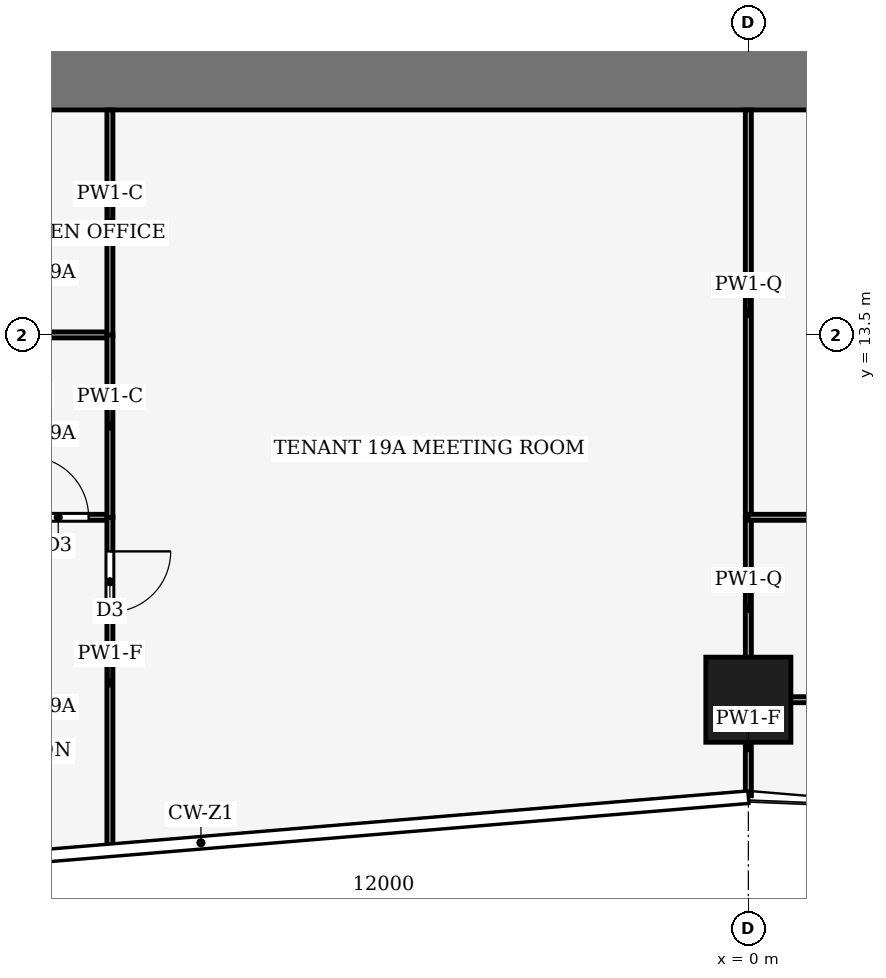
"""IFC4 building model, lengths in metres.
Left out: names, types, materials, properties, quantities, classifications, styles, units other than length and angle.
Written with IfcOpenShell. Run it as: python <this file> out.ifc"""

import sys

from ifc_helpers import new_model, si_unit, direction, frame, frame_2d, origin, origin_2d, place, context, subcontext, project, spatial, rectangle, hollow_rectangle, extrude, element, fill, save


model = new_model("IFC4")
c1 = context("Model", 3, precision=1e-05, world=origin(), true_north=direction((0.0, 1.0)))
c2 = subcontext(c1, "Body", "Model", "MODEL_VIEW")
j1 = project(units=[si_unit("LENGTHUNIT", "METRE"), si_unit("PLANEANGLEUNIT", "RADIAN")], contexts=[c1])
p1 = place(None, origin())
s1 = spatial("IfcSite", under=j1, at=p1, CompositionType="ELEMENT")
p2 = place(p1, origin())
s2 = spatial("IfcBuilding", under=s1, at=p2, CompositionType="ELEMENT")
p3 = place(p2, frame((0.0, 0.0, 86.0)))
s3 = spatial("IfcBuildingStorey", under=s2, at=p3, CompositionType="ELEMENT", Elevation=86.0)
p4 = place(p3, frame((-13.8, 17.8, -0.13), z_axis=(0.0, 0.0, 1.0), x_axis=(1.0, 0.0, 0.0)))
e1 = element("IfcWall", 1, at=p4, inside=s3, PredefinedType="SHEAR", context=c2, shape_type="SweptSolid", body=[
    extrude(rectangle(XDim=27.6, YDim=1.2, at=frame_2d((13.8, 0.0))), origin(), (0.0, 0.0, 1.0), 4.0),
])
p5 = place(p3, frame((0.0, 7.5, 0.0), z_axis=(0.0, 0.0, 1.0), x_axis=(1.0, 0.0, 0.0)))
e2 = element("IfcColumn", 2, at=p5, inside=s3, PredefinedType="COLUMN", context=c2, shape_type="SweptSolid", body=[
    extrude(hollow_rectangle(XDim=1.4, YDim=1.4, WallThickness=0.08, at=origin_2d()), origin(), (0.0, 0.0, 1.0), 4.0),
])
p6 = place(p3, frame((-13.8, 10.5, 0.0), z_axis=(0.0, 0.0, 1.0), x_axis=(1.0, 0.0, 0.0)))
e3 = element("IfcWall", 3, at=p6, inside=s3, PredefinedType="PARTITIONING", context=c2, shape_type="SweptSolid", body=[
    extrude(rectangle(XDim=3.3, YDim=0.1, at=frame_2d((1.65, 0.0))), origin(), (0.0, 0.0, 1.0), 3.44),
])
p7 = place(p6, frame((1.95, 0.0, 0.0)))
e4 = element("IfcOpeningElement", 4, at=p7, cuts=e3, PredefinedType="OPENING", context=c2, shape_type="SweptSolid", body=[
    extrude(rectangle(XDim=1.0, YDim=2.1, at=frame_2d((0.5, 1.05))), frame((0.0, 0.06, 0.0), z_axis=(0.0, -1.0, 0.0), x_axis=(1.0, 0.0, 0.0)), (0.0, 0.0, 1.0), 0.12),
])
p8 = place(p3, frame((-10.5, 10.504, 0.0), z_axis=(0.0, 0.0, 1.0), x_axis=(0.0, -1.0, 0.0)))
e5 = element("IfcWall", 5, at=p8, inside=s3, PredefinedType="PARTITIONING", context=c2, shape_type="SweptSolid", body=[
    extrude(rectangle(XDim=5.459, YDim=0.1, at=frame_2d((2.729, 0.0))), origin(), (0.0, 0.0, 1.0), 3.04),
])
p9 = place(p8, frame((0.564, 0.0, 0.0)))
e6 = element("IfcOpeningElement", 6, at=p9, cuts=e5, PredefinedType="OPENING", context=c2, shape_type="SweptSolid", body=[
    extrude(rectangle(XDim=1.0, YDim=2.1, at=frame_2d((0.5, 1.05))), frame((0.0, 0.06, 0.0), z_axis=(0.0, -1.0, 0.0), x_axis=(1.0, 0.0, 0.0)), (0.0, 0.0, 1.0), 0.12),
])
p10 = place(p3, frame((-10.5, 13.5, 0.0), z_axis=(0.0, 0.0, 1.0), x_axis=(-1.0, 0.0, 0.0)))
e7 = element("IfcWall", 7, at=p10, inside=s3, PredefinedType="PARTITIONING", context=c2, shape_type="SweptSolid", body=[
    extrude(rectangle(XDim=3.3, YDim=0.1, at=frame_2d((1.65, 0.0))), origin(), (0.0, 0.0, 1.0), 3.44),
])
p11 = place(p3, frame((-10.5, 10.496, 0.0), z_axis=(0.0, 0.0, 1.0), x_axis=(0.0, 1.0, 0.0)))
e8 = element("IfcWall", 8, at=p11, inside=s3, PredefinedType="PARTITIONING", context=c2, shape_type="SweptSolid", body=[
    extrude(rectangle(XDim=3.008, YDim=0.1, at=frame_2d((1.504, 0.0))), origin(), (0.0, 0.0, 1.0), 3.87),
])
p12 = place(p3, frame((-10.5, 13.496, 0.0), z_axis=(0.0, 0.0, 1.0), x_axis=(0.0, 1.0, 0.0)))
e9 = element("IfcWall", 9, at=p12, inside=s3, PredefinedType="PARTITIONING", context=c2, shape_type="SweptSolid", body=[
    extrude(rectangle(XDim=3.704, YDim=0.1, at=frame_2d((1.852, 0.0))), origin(), (0.0, 0.0, 1.0), 3.87),
])
p13 = place(p3, frame((0.0, 5.92, 0.0), z_axis=(0.0, 0.0, 1.0), x_axis=(0.0, 1.0, 0.0)))
e10 = element("IfcWall", 10, at=p13, inside=s3, PredefinedType="PARTITIONING", context=c2, shape_type="SweptSolid", body=[
    extrude(rectangle(XDim=1.58, YDim=0.1, at=frame_2d((0.79, 0.0))), origin(), (0.0, 0.0, 1.0), 3.04),
])
p14 = place(p3, frame((0.0, 7.5, 0.0), z_axis=(0.0, 0.0, 1.0), x_axis=(0.0, 1.0, 0.0)))
e11 = element("IfcWall", 11, at=p14, inside=s3, PredefinedType="PARTITIONING", context=c2, shape_type="SweptSolid", body=[
    extrude(rectangle(XDim=3.0, YDim=0.1, at=frame_2d((1.5, 0.0))), origin(), (0.0, 0.0, 1.0), 3.48),
])
p15 = place(p3, frame((0.0, 10.5, 0.0), z_axis=(0.0, 0.0, 1.0), x_axis=(0.0, 1.0, 0.0)))
e12 = element("IfcWall", 12, at=p15, inside=s3, PredefinedType="PARTITIONING", context=c2, shape_type="SweptSolid", body=[
    extrude(rectangle(XDim=6.7, YDim=0.1, at=frame_2d((3.35, 0.0))), origin(), (0.0, 0.0, 1.0), 3.48),
])
p16 = place(p3, frame((0.0, 7.5, 0.0), z_axis=(0.0, 0.0, 1.0), x_axis=(1.0, 0.0, 0.0)))
e13 = element("IfcWall", 13, at=p16, inside=s3, PredefinedType="PARTITIONING", context=c2, shape_type="SweptSolid", body=[
    extrude(rectangle(XDim=7.5, YDim=0.1, at=frame_2d((3.75, 0.0))), origin(), (0.0, 0.0, 1.0), 3.44),
])
p17 = place(p16, frame((3.65, 0.0, 0.0)))
e14 = element("IfcOpeningElement", 14, at=p17, cuts=e13, PredefinedType="OPENING", context=c2, shape_type="SweptSolid", body=[
    extrude(rectangle(XDim=1.0, YDim=2.1, at=frame_2d((0.5, 1.05))), frame((0.0, 0.06, 0.0), z_axis=(0.0, -1.0, 0.0), x_axis=(1.0, 0.0, 0.0)), (0.0, 0.0, 1.0), 0.12),
])
p18 = place(p3, frame((7.5, 10.5, 0.0), z_axis=(0.0, 0.0, 1.0), x_axis=(-1.0, 0.0, 0.0)))
e15 = element("IfcWall", 15, at=p18, inside=s3, PredefinedType="PARTITIONING", context=c2, shape_type="SweptSolid", body=[
    extrude(rectangle(XDim=7.5, YDim=0.1, at=frame_2d((3.75, 0.0))), origin(), (0.0, 0.0, 1.0), 3.44),
])
p19 = place(p7, origin())
e16 = element("IfcDoor", 16, at=p19, inside=s3, OperationType="SINGLE_SWING_RIGHT", PredefinedType="DOOR", context=c2, shape_type="SweptSolid", body=[
    extrude(rectangle(XDim=1.0, YDim=2.1, at=frame_2d((0.5, 1.05))), frame((0.0, 0.025, 0.0), z_axis=(0.0, -1.0, 0.0), x_axis=(1.0, 0.0, 0.0)), (0.0, 0.0, 1.0), 0.05),
])
fill(e4, e16)
p20 = place(p9, origin())
e17 = element("IfcDoor", 17, at=p20, inside=s3, OperationType="SINGLE_SWING_LEFT", PredefinedType="DOOR", context=c2, shape_type="SweptSolid", body=[
    extrude(rectangle(XDim=1.0, YDim=2.1, at=frame_2d((0.5, 1.05))), frame((0.0, 0.025, 0.0), z_axis=(0.0, -1.0, 0.0), x_axis=(1.0, 0.0, 0.0)), (0.0, 0.0, 1.0), 0.05),
])
fill(e6, e17)
save(model, sys.argv[1])
